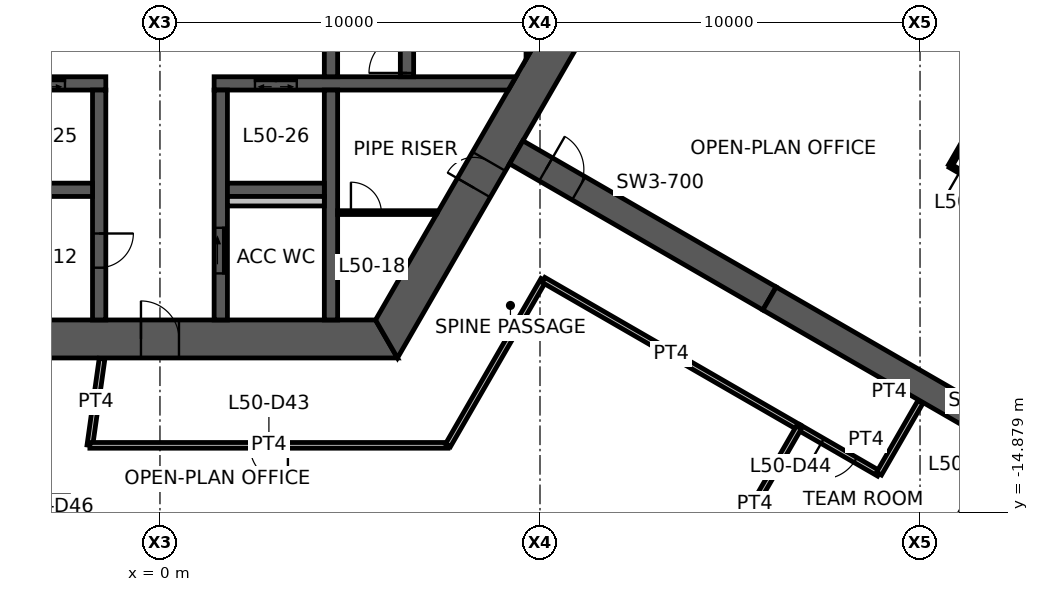
"""IFC4 building model, lengths in metres.
Left out: names, types, materials, properties, quantities, classifications, styles, units other than length and angle.
Written with IfcOpenShell. Run it as: python <this file> out.ifc"""

import sys

from ifc_helpers import new_model, si_unit, direction, frame, frame_2d, origin, place, context, subcontext, project, spatial, polyline, rectangle, outline, extrude, element, fill, save


model = new_model("IFC4")
c1 = context("Model", 3, precision=1e-05, world=origin(), true_north=direction((0.0, 1.0)))
c2 = subcontext(c1, "Body", "Model", "MODEL_VIEW")
j1 = project(units=[si_unit("LENGTHUNIT", "METRE"), si_unit("PLANEANGLEUNIT", "RADIAN")], contexts=[c1])
p1 = place(None, origin())
s1 = spatial("IfcSite", under=j1, at=p1, CompositionType="ELEMENT")
p2 = place(p1, origin())
s2 = spatial("IfcBuilding", under=s1, at=p2, CompositionType="ELEMENT")
p3 = place(p2, frame((0.0, 0.0, 199.4)))
s3 = spatial("IfcBuildingStorey", under=s2, at=p3, CompositionType="ELEMENT", Elevation=199.4)
p4 = place(p3, frame((-5.961, -10.325, 0.0), z_axis=(0.0, 0.0, 1.0), x_axis=(1.0, 0.0, 0.0)))
e1 = element("IfcWall", 1, at=p4, inside=s3, PredefinedType="SHEAR", context=c2, shape_type="SweptSolid", body=[
    extrude(outline(polyline([(-0.289, -0.5), (5.461, -0.5), (6.461, -0.5), (12.211, -0.5), (11.634, 0.5), (6.461, 0.5), (5.461, 0.5), (0.289, 0.5), (-0.289, -0.5)])), origin(), (0.0, 0.0, 1.0), 3.9),
])
p5 = place(p4, frame((5.461, 0.0, 0.0)))
e2 = element("IfcOpeningElement", 2, at=p5, cuts=e1, PredefinedType="OPENING", context=c2, shape_type="SweptSolid", body=[
    extrude(rectangle(XDim=1.0, YDim=2.1, at=frame_2d((0.5, 1.05))), frame((0.0, 0.51, 0.0), z_axis=(0.0, -1.0, 0.0), x_axis=(1.0, 0.0, 0.0)), (0.0, 0.0, 1.0), 1.02),
])
p6 = place(p3, frame((5.961, -10.325, 0.0), z_axis=(0.0, 0.0, 1.0), x_axis=(0.500004296715, 0.866022923061, 0.0)))
e3 = element("IfcWall", 3, at=p6, inside=s3, PredefinedType="SHEAR", context=c2, shape_type="SweptSolid", body=[
    extrude(outline(polyline([(-0.289, -0.5), (4.594, -0.5), (5.394, -0.5), (12.211, -0.5), (11.634, 0.5), (5.394, 0.5), (4.594, 0.5), (0.289, 0.5), (-0.289, -0.5)])), origin(), (0.0, 0.0, 1.0), 3.9),
])
p7 = place(p6, frame((4.594, 0.0, 0.0)))
e4 = element("IfcOpeningElement", 4, at=p7, cuts=e3, PredefinedType="OPENING", context=c2, shape_type="SweptSolid", body=[
    extrude(rectangle(XDim=0.8, YDim=2.1, at=frame_2d((0.4, 1.05))), frame((0.0, 0.51, 0.0), z_axis=(0.0, -1.0, 0.0), x_axis=(1.0, 0.0, 0.0)), (0.0, 0.0, 1.0), 1.02),
])
p8 = place(p3, frame((9.375, -5.413, 0.0), z_axis=(0.0, 0.0, 1.0), x_axis=(0.866032377459, -0.499987921047, 0.0)))
e5 = element("IfcWall", 5, at=p8, inside=s3, PredefinedType="SHEAR", context=c2, shape_type="SweptSolid", body=[
    extrude(rectangle(XDim=7.696, YDim=0.7, at=frame_2d((3.848, 0.0))), origin(), (0.0, 0.0, 1.0), 3.9),
])
p9 = place(p8, frame((0.9, 0.0, 0.0)))
e6 = element("IfcOpeningElement", 6, at=p9, cuts=e5, PredefinedType="OPENING", context=c2, shape_type="SweptSolid", body=[
    extrude(rectangle(XDim=1.0, YDim=2.1, at=frame_2d((0.5, 1.05))), frame((0.0, 0.36, 0.0), z_axis=(0.0, -1.0, 0.0), x_axis=(1.0, 0.0, 0.0)), (0.0, 0.0, 1.0), 0.72),
])
p10 = place(p3, frame((16.039, -9.26, 0.0), z_axis=(0.0, 0.0, 1.0), x_axis=(0.866024837091, -0.50000098154, 0.0)))
e7 = element("IfcWall", 7, at=p10, inside=s3, PredefinedType="SHEAR", context=c2, shape_type="SweptSolid", body=[
    extrude(rectangle(XDim=13.0, YDim=0.7, at=frame_2d((6.5, 0.0))), origin(), (0.0, 0.0, 1.0), 3.9),
])
p11 = place(p3, frame((-9.266, -3.6, 0.0), z_axis=(0.0, 0.0, 1.0), x_axis=(1.0, 0.0, 0.0)))
e8 = element("IfcWall", 8, at=p11, inside=s3, PredefinedType="SHEAR", context=c2, shape_type="SweptSolid", body=[
    extrude(outline(polyline([(0.101, -0.175), (3.116, -0.175), (4.417, -0.175), (5.667, -0.175), (6.767, -0.175), (7.841, -0.175), (7.841, 0.175), (6.767, 0.175), (5.667, 0.175), (4.417, 0.175), (3.116, 0.175), (-0.101, 0.175), (0.101, -0.175)])), origin(), (0.0, 0.0, 1.0), 3.9),
])
p12 = place(p11, frame((5.667, 0.0, 0.0)))
e9 = element("IfcOpeningElement", 9, at=p12, cuts=e8, PredefinedType="OPENING", context=c2, shape_type="SweptSolid", body=[
    extrude(rectangle(XDim=1.1, YDim=2.1, at=frame_2d((0.55, 1.05))), frame((0.0, 0.185, 0.0), z_axis=(0.0, -1.0, 0.0), x_axis=(1.0, 0.0, 0.0)), (0.0, 0.0, 1.0), 0.37),
])
p13 = place(p11, frame((3.116, 0.0, 0.0)))
e10 = element("IfcOpeningElement", 10, at=p13, cuts=e8, PredefinedType="OPENING", context=c2, shape_type="SweptSolid", body=[
    extrude(rectangle(XDim=1.3, YDim=2.1, at=frame_2d((0.65, 1.05))), frame((0.0, 0.185, 0.0), z_axis=(0.0, -1.0, 0.0), x_axis=(1.0, 0.0, 0.0)), (0.0, 0.0, 1.0), 0.37),
])
p14 = place(p3, frame((1.425, -3.6, 0.0), z_axis=(0.0, 0.0, 1.0), x_axis=(1.0, 0.0, 0.0)))
e11 = element("IfcWall", 11, at=p14, inside=s3, PredefinedType="SHEAR", context=c2, shape_type="SweptSolid", body=[
    extrude(outline(polyline([(0.0, -0.175), (1.075, -0.175), (2.175, -0.175), (7.74, -0.175), (7.942, 0.175), (2.175, 0.175), (1.075, 0.175), (0.0, 0.175), (0.0, -0.175)])), origin(), (0.0, 0.0, 1.0), 3.9),
])
p15 = place(p14, frame((1.075, 0.0, 0.0)))
e12 = element("IfcOpeningElement", 12, at=p15, cuts=e11, PredefinedType="OPENING", context=c2, shape_type="SweptSolid", body=[
    extrude(rectangle(XDim=1.1, YDim=2.1, at=frame_2d((0.55, 1.05))), frame((0.0, 0.185, 0.0), z_axis=(0.0, -1.0, 0.0), x_axis=(1.0, 0.0, 0.0)), (0.0, 0.0, 1.0), 0.37),
])
p16 = place(p3, frame((-1.6, -3.775, 0.0), z_axis=(0.0, 0.0, 1.0), x_axis=(0.0, -1.0, 0.0)))
e13 = element("IfcWall", 13, at=p16, inside=s3, PredefinedType="SHEAR", context=c2, shape_type="SweptSolid", body=[
    extrude(rectangle(XDim=6.05, YDim=0.35, at=frame_2d((3.025, 0.0))), origin(), (0.0, 0.0, 1.0), 3.9),
])
p17 = place(p16, frame((3.775, 0.0, 0.0)))
e14 = element("IfcOpeningElement", 14, at=p17, cuts=e13, PredefinedType="OPENING", context=c2, shape_type="SweptSolid", body=[
    extrude(rectangle(XDim=0.9, YDim=2.1, at=frame_2d((0.45, 1.05))), frame((0.0, 0.185, 0.0), z_axis=(0.0, -1.0, 0.0), x_axis=(1.0, 0.0, 0.0)), (0.0, 0.0, 1.0), 0.37),
])
p18 = place(p3, frame((1.6, -3.775, 0.0), z_axis=(0.0, 0.0, 1.0), x_axis=(0.0, -1.0, 0.0)))
e15 = element("IfcWall", 15, at=p18, inside=s3, PredefinedType="SHEAR", context=c2, shape_type="SweptSolid", body=[
    extrude(rectangle(XDim=6.05, YDim=0.35, at=frame_2d((3.025, 0.0))), origin(), (0.0, 0.0, 1.0), 3.9),
])
p19 = place(p18, frame((3.625, 0.0, 0.0)))
e16 = element("IfcOpeningElement", 16, at=p19, cuts=e15, PredefinedType="OPENING", context=c2, shape_type="SweptSolid", body=[
    extrude(rectangle(XDim=1.2, YDim=2.1, at=frame_2d((0.6, 1.05))), frame((0.0, 0.185, 0.0), z_axis=(0.0, -1.0, 0.0), x_axis=(1.0, 0.0, 0.0)), (0.0, 0.0, 1.0), 0.37),
])
p20 = place(p3, frame((4.5, -3.425, 0.0), z_axis=(0.0, 0.0, 1.0), x_axis=(0.0, 1.0, 0.0)))
e17 = element("IfcWall", 17, at=p20, inside=s3, PredefinedType="SHEAR", context=c2, shape_type="SweptSolid", body=[
    extrude(rectangle(XDim=6.85, YDim=0.35, at=frame_2d((3.425, 0.0))), origin(), (0.0, 0.0, 1.0), 3.9),
])
p21 = place(p20, frame((2.925, 0.0, 0.0)))
e18 = element("IfcOpeningElement", 18, at=p21, cuts=e17, PredefinedType="OPENING", context=c2, shape_type="SweptSolid", body=[
    extrude(rectangle(XDim=1.0, YDim=2.1, at=frame_2d((0.5, 1.05))), frame((0.0, 0.185, 0.0), z_axis=(0.0, -1.0, 0.0), x_axis=(1.0, 0.0, 0.0)), (0.0, 0.0, 1.0), 0.37),
])
p22 = place(p3, frame((6.5, -3.425, 0.0), z_axis=(0.0, 0.0, 1.0), x_axis=(0.0, 1.0, 0.0)))
e19 = element("IfcWall", 19, at=p22, inside=s3, PredefinedType="SHEAR", context=c2, shape_type="SweptSolid", body=[
    extrude(rectangle(XDim=6.85, YDim=0.35, at=frame_2d((3.425, 0.0))), origin(), (0.0, 0.0, 1.0), 3.9),
])
p23 = place(p22, frame((0.1, 0.0, 0.0)))
e20 = element("IfcOpeningElement", 20, at=p23, cuts=e19, PredefinedType="OPENING", context=c2, shape_type="SweptSolid", body=[
    extrude(rectangle(XDim=1.0, YDim=2.1, at=frame_2d((0.5, 1.05))), frame((0.0, 0.185, 0.0), z_axis=(0.0, -1.0, 0.0), x_axis=(1.0, 0.0, 0.0)), (0.0, 0.0, 1.0), 0.37),
])
p24 = place(p3, frame((4.5, -3.775, 0.0), z_axis=(0.0, 0.0, 1.0), x_axis=(0.0, -1.0, 0.0)))
e21 = element("IfcWall", 21, at=p24, inside=s3, PredefinedType="SHEAR", context=c2, shape_type="SweptSolid", body=[
    extrude(rectangle(XDim=6.05, YDim=0.35, at=frame_2d((3.025, 0.0))), origin(), (0.0, 0.0, 1.0), 3.9),
])
for number, where, z_axis, x_axis in (
    (22, (-4.325, -6.4, 0.0), (0.0, 0.0, 1.0), (1.0, 0.0, 0.0)),
    (23, (1.775, -6.4, 0.0), (0.0, 0.0, 1.0), (1.0, 0.0, 0.0)),
):
    element("IfcWall", number, at=place(p3, frame(where, z_axis=z_axis, x_axis=x_axis)), inside=s3, PredefinedType="SHEAR", context=c2, shape_type="SweptSolid", body=[
        extrude(rectangle(XDim=2.55, YDim=0.35, at=frame_2d((1.275, 0.0))), origin(), (0.0, 0.0, 1.0), 3.9),
    ])
p25 = place(p3, frame((9.808, -2.662, 0.0), z_axis=(0.0, 0.0, 1.0), x_axis=(0.0, 1.0, 0.0)))
e24 = element("IfcWall", 24, at=p25, inside=s3, PredefinedType="SHEAR", context=c2, shape_type="SweptSolid", body=[
    extrude(outline(polyline([(0.303, -0.175), (5.021, -0.175), (5.628, 0.175), (-0.303, 0.175), (0.303, -0.175)])), origin(), (0.0, 0.0, 1.0), 3.9),
])
p26 = place(p3, frame((1.775, -6.7, 0.0), z_axis=(0.0, 0.0, 1.0), x_axis=(1.0, 0.0, 0.0)))
e25 = element("IfcWall", 25, at=p26, inside=s3, PredefinedType="PLUMBINGWALL", context=c2, shape_type="SweptSolid", body=[
    extrude(rectangle(XDim=2.55, YDim=0.25, at=frame_2d((1.275, 0.0))), origin(), (0.0, 0.0, 1.0), 3.9),
])
p27 = place(p3, frame((4.675, -7.0, 0.0), z_axis=(0.0, 0.0, 1.0), x_axis=(1.0, 0.0, 0.0)))
e26 = element("IfcWall", 26, at=p27, inside=s3, PredefinedType="PARTITIONING", context=c2, shape_type="SweptSolid", body=[
    extrude(outline(polyline([(0.0, -0.05), (0.35, -0.05), (1.15, -0.05), (2.6, -0.05), (2.628, 0.0), (2.634, 0.05), (1.15, 0.05), (0.35, 0.05), (0.0, 0.05), (0.0, -0.05)])), origin(), (0.0, 0.0, 1.0), 2.35),
])
p28 = place(p27, frame((0.35, 0.0, 0.0)))
e27 = element("IfcOpeningElement", 27, at=p28, cuts=e26, PredefinedType="OPENING", context=c2, shape_type="SweptSolid", body=[
    extrude(rectangle(XDim=0.8, YDim=2.1, at=frame_2d((0.4, 1.05))), frame((0.0, 0.06, 0.0), z_axis=(0.0, -1.0, 0.0), x_axis=(1.0, 0.0, 0.0)), (0.0, 0.0, 1.0), 0.12),
])
p29 = place(p3, frame((20.792, -5.769, 0.0), z_axis=(0.0, 0.0, 1.0), x_axis=(0.500005339912, 0.866022320763, 0.0)))
e28 = element("IfcWall", 28, at=p29, inside=s3, PredefinedType="PARTITIONING", context=c2, shape_type="SweptSolid", body=[
    extrude(rectangle(XDim=5.08, YDim=0.1, at=frame_2d((2.54, 0.0))), origin(), (0.0, 0.0, 1.0), 2.35),
])
p30 = place(p3, frame((26.527, -9.075, 0.0), z_axis=(0.0, 0.0, 1.0), x_axis=(-0.866343956507, 0.499447844147, 0.0)))
e29 = element("IfcWall", 29, at=p30, inside=s3, PredefinedType="PARTITIONING", context=c2, shape_type="SweptSolid", body=[
    extrude(rectangle(XDim=6.62, YDim=0.1, at=frame_2d((3.31, 0.0))), origin(), (0.0, 0.0, 1.0), 2.35),
])
p31 = place(p30, frame((5.42, 0.0, 0.0)))
e30 = element("IfcOpeningElement", 30, at=p31, cuts=e29, PredefinedType="OPENING", context=c2, shape_type="SweptSolid", body=[
    extrude(rectangle(XDim=0.9, YDim=2.1, at=frame_2d((0.45, 1.05))), frame((0.0, 0.06, 0.0), z_axis=(0.0, -1.0, 0.0), x_axis=(1.0, 0.0, 0.0)), (0.0, 0.0, 1.0), 0.12),
])
p32 = place(p3, frame((-1.844, -13.125, 0.0), z_axis=(0.0, 0.0, 1.0), x_axis=(0.139119980631, 0.990275532864, 0.0)))
e31 = element("IfcWall", 31, at=p32, inside=s3, PredefinedType="PARTITIONING", context=c2, shape_type="SweptSolid", body=[
    extrude(rectangle(XDim=2.302, YDim=0.15, at=frame_2d((1.151, 0.0))), origin(), (0.0, 0.0, 1.0), 2.35),
])
p33 = place(p3, frame((7.578, -13.125, 0.0), z_axis=(0.0, 0.0, 1.0), x_axis=(-1.0, 0.0, 0.0)))
e32 = element("IfcWall", 32, at=p33, inside=s3, PredefinedType="PARTITIONING", context=c2, shape_type="SweptSolid", body=[
    extrude(rectangle(XDim=9.422, YDim=0.15, at=frame_2d((4.711, 0.0))), origin(), (0.0, 0.0, 1.0), 2.35),
])
p34 = place(p33, frame((4.211, 0.0, 0.0)))
e33 = element("IfcOpeningElement", 33, at=p34, cuts=e32, PredefinedType="OPENING", context=c2, shape_type="SweptSolid", body=[
    extrude(rectangle(XDim=1.0, YDim=2.1, at=frame_2d((0.5, 1.05))), frame((0.0, 0.085, 0.0), z_axis=(0.0, -1.0, 0.0), x_axis=(1.0, 0.0, 0.0)), (0.0, 0.0, 1.0), 0.17),
])
p35 = place(p3, frame((10.092, -8.771, 0.0), z_axis=(0.0, 0.0, 1.0), x_axis=(-0.500019495363, -0.866014147839, 0.0)))
e34 = element("IfcWall", 34, at=p35, inside=s3, PredefinedType="PARTITIONING", context=c2, shape_type="SweptSolid", body=[
    extrude(rectangle(XDim=5.028, YDim=0.15, at=frame_2d((2.514, 0.0))), origin(), (0.0, 0.0, 1.0), 2.35),
])
p36 = place(p3, frame((16.822, -12.656, 0.0), z_axis=(0.0, 0.0, 1.0), x_axis=(-0.866028634939, 0.499994403434, 0.0)))
e35 = element("IfcWall", 35, at=p36, inside=s3, PredefinedType="PARTITIONING", context=c2, shape_type="SweptSolid", body=[
    extrude(rectangle(XDim=7.771, YDim=0.15, at=frame_2d((3.885, 0.0))), origin(), (0.0, 0.0, 1.0), 2.35),
])
p37 = place(p3, frame((18.921, -13.869, 0.0), z_axis=(0.0, 0.0, 1.0), x_axis=(-0.866000196749, 0.500043657324, 0.0)))
e36 = element("IfcWall", 36, at=p37, inside=s3, PredefinedType="PARTITIONING", context=c2, shape_type="SweptSolid", body=[
    extrude(rectangle(XDim=2.434, YDim=0.15, at=frame_2d((1.217, 0.0))), origin(), (0.0, 0.0, 1.0), 2.35),
])
p38 = place(p37, frame((0.717, 0.0, 0.0)))
e37 = element("IfcOpeningElement", 37, at=p38, cuts=e36, PredefinedType="OPENING", context=c2, shape_type="SweptSolid", body=[
    extrude(rectangle(XDim=1.0, YDim=2.1, at=frame_2d((0.5, 1.05))), frame((0.0, 0.085, 0.0), z_axis=(0.0, -1.0, 0.0), x_axis=(1.0, 0.0, 0.0)), (0.0, 0.0, 1.0), 0.17),
])
p39 = place(p3, frame((20.011, -11.981, 0.0), z_axis=(0.0, 0.0, 1.0), x_axis=(-0.500029427677, -0.866008413041, 0.0)))
e38 = element("IfcWall", 38, at=p39, inside=s3, PredefinedType="PARTITIONING", context=c2, shape_type="SweptSolid", body=[
    extrude(rectangle(XDim=2.18, YDim=0.15, at=frame_2d((1.09, 0.0))), origin(), (0.0, 0.0, 1.0), 2.35),
])
p40 = place(p3, frame((18.678, -19.097, 0.0), z_axis=(0.0, 0.0, 1.0), x_axis=(0.499488276661, 0.86632064588, 0.0)))
e39 = element("IfcWall", 39, at=p40, inside=s3, PredefinedType="PARTITIONING", context=c2, shape_type="SweptSolid", body=[
    extrude(rectangle(XDim=6.83, YDim=0.1, at=frame_2d((3.415, 0.0))), origin(), (0.0, 0.0, 1.0), 2.35),
])
p41 = place(p40, frame((5.63, 0.0, 0.0)))
e40 = element("IfcOpeningElement", 40, at=p41, cuts=e39, PredefinedType="OPENING", context=c2, shape_type="SweptSolid", body=[
    extrude(rectangle(XDim=0.9, YDim=2.1, at=frame_2d((0.45, 1.05))), frame((0.0, 0.06, 0.0), z_axis=(0.0, -1.0, 0.0), x_axis=(1.0, 0.0, 0.0)), (0.0, 0.0, 1.0), 0.12),
])
p42 = place(p3, frame((16.812, -12.652, 0.0), z_axis=(0.0, 0.0, 1.0), x_axis=(-0.499085020987, -0.86655302309, 0.0)))
e41 = element("IfcWall", 41, at=p42, inside=s3, PredefinedType="PARTITIONING", context=c2, shape_type="SweptSolid", body=[
    extrude(rectangle(XDim=4.654, YDim=0.15, at=frame_2d((2.327, 0.0))), origin(), (0.0, 0.0, 1.0), 2.35),
])
p43 = place(p5, origin())
e42 = element("IfcDoor", 42, at=p43, inside=s3, OperationType="SINGLE_SWING_LEFT", PredefinedType="DOOR", context=c2, shape_type="SweptSolid", body=[
    extrude(rectangle(XDim=1.0, YDim=2.1, at=frame_2d((0.5, 1.05))), frame((0.0, 0.025, 0.0), z_axis=(0.0, -1.0, 0.0), x_axis=(1.0, 0.0, 0.0)), (0.0, 0.0, 1.0), 0.05),
])
fill(e2, e42)
p44 = place(p7, origin())
e43 = element("IfcDoor", 43, at=p44, inside=s3, OperationType="SINGLE_SWING_LEFT", PredefinedType="DOOR", context=c2, shape_type="SweptSolid", body=[
    extrude(rectangle(XDim=0.8, YDim=2.1, at=frame_2d((0.4, 1.05))), frame((0.0, 0.025, 0.0), z_axis=(0.0, -1.0, 0.0), x_axis=(1.0, 0.0, 0.0)), (0.0, 0.0, 1.0), 0.05),
])
fill(e4, e43)
p45 = place(p23, origin())
e44 = element("IfcDoor", 44, at=p45, inside=s3, OperationType="SINGLE_SWING_LEFT", PredefinedType="DOOR", context=c2, shape_type="SweptSolid", body=[
    extrude(rectangle(XDim=1.0, YDim=2.1, at=frame_2d((0.5, 1.05))), frame((0.0, 0.025, 0.0), z_axis=(0.0, -1.0, 0.0), x_axis=(1.0, 0.0, 0.0)), (0.0, 0.0, 1.0), 0.05),
])
fill(e20, e44)
p46 = place(p19, origin())
e45 = element("IfcDoor", 45, at=p46, inside=s3, OperationType="SLIDING_TO_LEFT", PredefinedType="DOOR", context=c2, shape_type="SweptSolid", body=[
    extrude(rectangle(XDim=1.2, YDim=2.1, at=frame_2d((0.6, 1.05))), frame((0.0, 0.025, 0.0), z_axis=(0.0, -1.0, 0.0), x_axis=(1.0, 0.0, 0.0)), (0.0, 0.0, 1.0), 0.05),
])
fill(e16, e45)
p47 = place(p17, origin())
e46 = element("IfcDoor", 46, at=p47, inside=s3, OperationType="SINGLE_SWING_LEFT", PredefinedType="DOOR", context=c2, shape_type="SweptSolid", body=[
    extrude(rectangle(XDim=0.9, YDim=2.1, at=frame_2d((0.45, 1.05))), frame((0.0, 0.025, 0.0), z_axis=(0.0, -1.0, 0.0), x_axis=(1.0, 0.0, 0.0)), (0.0, 0.0, 1.0), 0.05),
])
fill(e14, e46)
p48 = place(p9, origin())
e47 = element("IfcDoor", 47, at=p48, inside=s3, OperationType="SINGLE_SWING_LEFT", PredefinedType="DOOR", context=c2, shape_type="SweptSolid", body=[
    extrude(rectangle(XDim=1.0, YDim=2.1, at=frame_2d((0.5, 1.05))), frame((0.0, 0.025, 0.0), z_axis=(0.0, -1.0, 0.0), x_axis=(1.0, 0.0, 0.0)), (0.0, 0.0, 1.0), 0.05),
])
fill(e6, e47)
p49 = place(p28, origin())
e48 = element("IfcDoor", 48, at=p49, inside=s3, OperationType="SINGLE_SWING_LEFT", PredefinedType="DOOR", context=c2, shape_type="SweptSolid", body=[
    extrude(rectangle(XDim=0.8, YDim=2.1, at=frame_2d((0.4, 1.05))), frame((0.0, 0.025, 0.0), z_axis=(0.0, -1.0, 0.0), x_axis=(1.0, 0.0, 0.0)), (0.0, 0.0, 1.0), 0.05),
])
fill(e27, e48)
p50 = place(p34, origin())
e49 = element("IfcDoor", 49, at=p50, inside=s3, OperationType="SINGLE_SWING_LEFT", PredefinedType="DOOR", context=c2, shape_type="SweptSolid", body=[
    extrude(rectangle(XDim=1.0, YDim=2.1, at=frame_2d((0.5, 1.05))), frame((0.0, 0.025, 0.0), z_axis=(0.0, -1.0, 0.0), x_axis=(1.0, 0.0, 0.0)), (0.0, 0.0, 1.0), 0.05),
])
fill(e33, e49)
p51 = place(p38, origin())
e50 = element("IfcDoor", 50, at=p51, inside=s3, OperationType="SINGLE_SWING_RIGHT", PredefinedType="DOOR", context=c2, shape_type="SweptSolid", body=[
    extrude(rectangle(XDim=1.0, YDim=2.1, at=frame_2d((0.5, 1.05))), frame((0.0, 0.025, 0.0), z_axis=(0.0, -1.0, 0.0), x_axis=(1.0, 0.0, 0.0)), (0.0, 0.0, 1.0), 0.05),
])
fill(e37, e50)
p52 = place(p15, origin())
e51 = element("IfcDoor", 51, at=p52, inside=s3, OperationType="DOUBLE_DOOR_SLIDING", PredefinedType="DOOR", context=c2, shape_type="SweptSolid", body=[
    extrude(rectangle(XDim=1.1, YDim=2.1, at=frame_2d((0.55, 1.05))), frame((0.0, 0.025, 0.0), z_axis=(0.0, -1.0, 0.0), x_axis=(1.0, 0.0, 0.0)), (0.0, 0.0, 1.0), 0.05),
])
fill(e12, e51)
p53 = place(p12, origin())
e52 = element("IfcDoor", 52, at=p53, inside=s3, OperationType="DOUBLE_DOOR_SLIDING", PredefinedType="DOOR", context=c2, shape_type="SweptSolid", body=[
    extrude(rectangle(XDim=1.1, YDim=2.1, at=frame_2d((0.55, 1.05))), frame((0.0, 0.025, 0.0), z_axis=(0.0, -1.0, 0.0), x_axis=(1.0, 0.0, 0.0)), (0.0, 0.0, 1.0), 0.05),
])
fill(e9, e52)
save(model, sys.argv[1])
